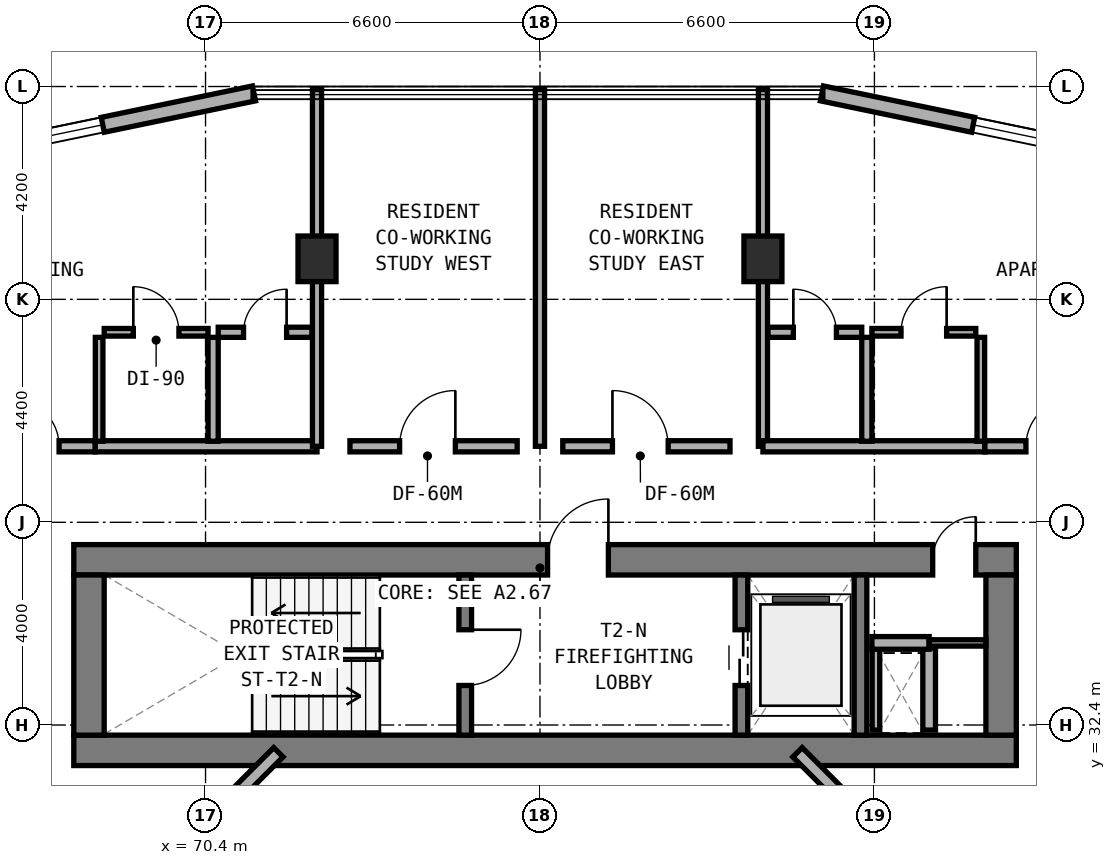
"""IFC4 building model, lengths in metres.
Left out: names, types, materials, properties, quantities, classifications, styles, units other than length and angle.
Written with IfcOpenShell. Run it as: python <this file> out.ifc"""

import sys

from ifc_helpers import new_model, si_unit, direction, frame, frame_2d, origin, origin_2d, place, context, subcontext, project, spatial, rectangle, extrude, element, fill, save


model = new_model("IFC4")
c1 = context("Model", 3, precision=1e-05, world=origin(), true_north=direction((0.0, 1.0)))
c2 = subcontext(c1, "Body", "Model", "MODEL_VIEW")
j1 = project(units=[si_unit("LENGTHUNIT", "METRE"), si_unit("PLANEANGLEUNIT", "RADIAN")], contexts=[c1])
p1 = place(None, origin())
s1 = spatial("IfcSite", under=j1, at=p1, CompositionType="ELEMENT")
p2 = place(p1, origin())
s2 = spatial("IfcBuilding", under=s1, at=p2, CompositionType="ELEMENT")
p3 = place(p2, frame((0.0, 0.0, 38.0)))
s3 = spatial("IfcBuildingStorey", under=s2, at=p3, CompositionType="ELEMENT", Elevation=38.0)
p4 = place(p3, frame((67.8, 31.9, 0.0), z_axis=(0.0, 0.0, 1.0), x_axis=(1.0, 0.0, 0.0)))
e1 = element("IfcWall", 1, at=p4, inside=s3, PredefinedType="SHEAR", context=c2, shape_type="SweptSolid", body=[
    extrude(rectangle(XDim=18.6, YDim=0.6, at=frame_2d((9.3, 0.0))), origin(), (0.0, 0.0, 1.0), 3.5),
])
p5 = place(p3, frame((67.8, 35.66, 0.0), z_axis=(0.0, 0.0, 1.0), x_axis=(1.0, 0.0, 0.0)))
e2 = element("IfcWall", 2, at=p5, inside=s3, PredefinedType="SHEAR", context=c2, shape_type="SweptSolid", body=[
    extrude(rectangle(XDim=18.6, YDim=0.6, at=frame_2d((9.3, 0.0))), origin(), (0.0, 0.0, 1.0), 3.5),
])
p6 = place(p5, frame((9.35, 0.0, 0.0)))
e3 = element("IfcOpeningElement", 3, at=p6, cuts=e2, PredefinedType="OPENING", context=c2, shape_type="SweptSolid", body=[
    extrude(rectangle(XDim=1.2, YDim=2.15, at=frame_2d((0.6, 1.075))), frame((0.0, 0.31, 0.0), z_axis=(0.0, -1.0, 0.0), x_axis=(1.0, 0.0, 0.0)), (0.0, 0.0, 1.0), 0.62),
])
p7 = place(p5, frame((16.95, 0.0, 0.0)))
e4 = element("IfcOpeningElement", 4, at=p7, cuts=e2, PredefinedType="OPENING", context=c2, shape_type="SweptSolid", body=[
    extrude(rectangle(XDim=0.85, YDim=2.1, at=frame_2d((0.425, 1.05))), frame((0.0, 0.31, 0.0), z_axis=(0.0, -1.0, 0.0), x_axis=(1.0, 0.0, 0.0)), (0.0, 0.0, 1.0), 0.62),
])
for number, where, z_axis, x_axis in (
    (5, (68.1, 32.2, 0.0), (0.0, 0.0, 1.0), (0.0, 1.0, 0.0)),
    (6, (86.1, 32.2, 0.0), (0.0, 0.0, 1.0), (0.0, 1.0, 0.0)),
):
    element("IfcWall", number, at=place(p3, frame(where, z_axis=z_axis, x_axis=x_axis)), inside=s3, PredefinedType="SHEAR", context=c2, shape_type="SweptSolid", body=[
        extrude(rectangle(XDim=3.16, YDim=0.6, at=frame_2d((1.58, 0.0))), origin(), (0.0, 0.0, 1.0), 3.5),
    ])
p8 = place(p3, frame((75.525, 32.2, 0.0), z_axis=(0.0, 0.0, 1.0), x_axis=(0.0, 1.0, 0.0)))
e7 = element("IfcWall", 7, at=p8, inside=s3, PredefinedType="STANDARD", context=c2, shape_type="SweptSolid", body=[
    extrude(rectangle(XDim=3.16, YDim=0.25, at=frame_2d((1.58, 0.0))), origin(), (0.0, 0.0, 1.0), 3.25),
])
p9 = place(p8, frame((0.98, 0.0, 0.0)))
e8 = element("IfcOpeningElement", 8, at=p9, cuts=e7, PredefinedType="OPENING", context=c2, shape_type="SweptSolid", body=[
    extrude(rectangle(XDim=1.1, YDim=2.15, at=frame_2d((0.55, 1.075))), frame((0.0, 0.135, 0.0), z_axis=(0.0, -1.0, 0.0), x_axis=(1.0, 0.0, 0.0)), (0.0, 0.0, 1.0), 0.27),
])
p10 = place(p3, frame((80.975, 32.2, 0.0), z_axis=(0.0, 0.0, 1.0), x_axis=(0.0, 1.0, 0.0)))
e9 = element("IfcWall", 9, at=p10, inside=s3, PredefinedType="STANDARD", context=c2, shape_type="SweptSolid", body=[
    extrude(rectangle(XDim=3.16, YDim=0.25, at=frame_2d((1.58, 0.0))), origin(), (0.0, 0.0, 1.0), 3.25),
])
p11 = place(p10, frame((0.98, 0.0, 0.0)))
e10 = element("IfcOpeningElement", 10, at=p11, cuts=e9, PredefinedType="OPENING", context=c2, shape_type="SweptSolid", body=[
    extrude(rectangle(XDim=1.1, YDim=2.15, at=frame_2d((0.55, 1.075))), frame((0.0, 0.135, 0.0), z_axis=(0.0, -1.0, 0.0), x_axis=(1.0, 0.0, 0.0)), (0.0, 0.0, 1.0), 0.27),
])
p12 = place(p3, frame((83.325, 32.2, 0.0), z_axis=(0.0, 0.0, 1.0), x_axis=(0.0, 1.0, 0.0)))
e11 = element("IfcWall", 11, at=p12, inside=s3, PredefinedType="STANDARD", context=c2, shape_type="SweptSolid", body=[
    extrude(rectangle(XDim=3.16, YDim=0.25, at=frame_2d((1.58, 0.0))), origin(), (0.0, 0.0, 1.0), 3.25),
])
for number, where, z_axis, x_axis in (
    (12, (72.6, 41.6, 0.0), (0.0, 0.0, 1.0), (1.0, 0.0, 0.0)),
    (13, (81.4, 41.6, 0.0), (0.0, 0.0, 1.0), (1.0, 0.0, 0.0)),
):
    element("IfcColumn", number, at=place(p3, frame(where, z_axis=z_axis, x_axis=x_axis)), inside=s3, PredefinedType="COLUMN", context=c2, shape_type="SweptSolid", body=[
        extrude(rectangle(XDim=0.75, YDim=0.9, at=origin_2d()), origin(), (0.0, 0.0, 1.0), 3.5),
    ])
p13 = place(p3, frame((91.298, 43.051, 0.0), z_axis=(0.0, 0.0, 1.0), x_axis=(-0.979128391325, 0.203242695569, 0.0)))
e14 = element("IfcWall", 14, at=p13, inside=s3, PredefinedType="STANDARD", context=c2, shape_type="SweptSolid", body=[
    extrude(rectangle(XDim=8.92, YDim=0.3, at=frame_2d((4.46, 0.0))), origin(), (0.0, 0.0, 1.0), 3.25),
])
p14 = place(p13, frame((3.472, 0.0, 0.8)))
e15 = element("IfcOpeningElement", 15, at=p14, cuts=e14, PredefinedType="OPENING", context=c2, shape_type="SweptSolid", body=[
    extrude(rectangle(XDim=2.4, YDim=1.6, at=frame_2d((1.2, 0.8))), frame((0.0, 0.16, 0.0), z_axis=(0.0, -1.0, 0.0), x_axis=(1.0, 0.0, 0.0)), (0.0, 0.0, 1.0), 0.32),
])
p15 = place(p3, frame((71.356, 44.864, 0.0), z_axis=(0.0, 0.0, 1.0), x_axis=(-0.979127260729, -0.203248142175, 0.0)))
e16 = element("IfcWall", 16, at=p15, inside=s3, PredefinedType="STANDARD", context=c2, shape_type="SweptSolid", body=[
    extrude(rectangle(XDim=8.92, YDim=0.3, at=frame_2d((4.46, 0.0))), origin(), (0.0, 0.0, 1.0), 3.25),
])
p16 = place(p15, frame((3.048, 0.0, 0.8)))
e17 = element("IfcOpeningElement", 17, at=p16, cuts=e16, PredefinedType="OPENING", context=c2, shape_type="SweptSolid", body=[
    extrude(rectangle(XDim=2.4, YDim=1.6, at=frame_2d((1.2, 0.8))), frame((0.0, 0.16, 0.0), z_axis=(0.0, -1.0, 0.0), x_axis=(1.0, 0.0, 0.0)), (0.0, 0.0, 1.0), 0.32),
])
for number, where, z_axis, x_axis in (
    (18, (83.716, 30.228, 0.0), (0.0, 0.0, 1.0), (-0.707, 0.707, 0.0)),
    (19, (71.838, 31.862, 0.0), (0.0, 0.0, 1.0), (-0.707, -0.707, 0.0)),
):
    element("IfcWall", number, at=place(p3, frame(where, z_axis=z_axis, x_axis=x_axis)), inside=s3, PredefinedType="STANDARD", context=c2, shape_type="SweptSolid", body=[
        extrude(rectangle(XDim=2.311, YDim=0.26, at=frame_2d((1.155, 0.0))), origin(), (0.0, 0.0, 1.0), 3.25),
    ])
p17 = place(p3, frame((83.63, 32.3, 0.0), z_axis=(0.0, 0.0, 1.0), x_axis=(0.0, 1.0, 0.0)))
e20 = element("IfcWall", 20, at=p17, inside=s3, PredefinedType="PARTITIONING", context=c2, shape_type="SweptSolid", body=[
    extrude(rectangle(XDim=1.62, YDim=0.15, at=frame_2d((0.81, 0.0))), origin(), (0.0, 0.0, 1.0), 2.725),
])
p18 = place(p3, frame((84.68, 32.3, 0.0), z_axis=(0.0, 0.0, 1.0), x_axis=(0.0, 1.0, 0.0)))
e21 = element("IfcWall", 21, at=p18, inside=s3, PredefinedType="SOLIDWALL", context=c2, shape_type="SweptSolid", body=[
    extrude(rectangle(XDim=1.62, YDim=0.25, at=frame_2d((0.81, 0.0))), origin(), (0.0, 0.0, 1.0), 3.22),
])
p19 = place(p3, frame((83.55, 34.02, 0.0), z_axis=(0.0, 0.0, 1.0), x_axis=(1.0, 0.0, 0.0)))
e22 = element("IfcWall", 22, at=p19, inside=s3, PredefinedType="SOLIDWALL", context=c2, shape_type="SweptSolid", body=[
    extrude(rectangle(XDim=1.13, YDim=0.25, at=frame_2d((0.565, 0.0))), origin(), (0.0, 0.0, 1.0), 3.22),
])
p20 = place(p3, frame((84.68, 34.02, 0.0), z_axis=(0.0, 0.0, 1.0), x_axis=(1.0, 0.0, 0.0)))
e23 = element("IfcWall", 23, at=p20, inside=s3, PredefinedType="PARTITIONING", context=c2, shape_type="SweptSolid", body=[
    extrude(rectangle(XDim=1.12, YDim=0.125, at=frame_2d((0.56, 0.0))), origin(), (0.0, 0.0, 1.0), 3.22),
])
p21 = place(p3, frame((68.22, 37.9, 0.0), z_axis=(0.0, 0.0, 1.0), x_axis=(1.0, 0.0, 0.0)))
e24 = element("IfcWall", 24, at=p21, inside=s3, PredefinedType="SOLIDWALL", context=c2, shape_type="SweptSolid", body=[
    extrude(rectangle(XDim=4.38, YDim=0.22, at=frame_2d((2.19, 0.0))), origin(), (0.0, 0.0, 1.0), 2.725),
])
p22 = place(p3, frame((65.85, 37.9, 0.0), z_axis=(0.0, 0.0, 1.0), x_axis=(1.0, 0.0, 0.0)))
e25 = element("IfcWall", 25, at=p22, inside=s3, PredefinedType="SOLIDWALL", context=c2, shape_type="SweptSolid", body=[
    extrude(rectangle(XDim=2.37, YDim=0.22, at=frame_2d((1.185, 0.0))), origin(), (0.0, 0.0, 1.0), 3.22),
])
p23 = place(p22, frame((0.71, 0.0, 0.0)))
e26 = element("IfcOpeningElement", 26, at=p23, cuts=e25, PredefinedType="OPENING", context=c2, shape_type="SweptSolid", body=[
    extrude(rectangle(XDim=0.95, YDim=2.1, at=frame_2d((0.475, 1.05))), frame((0.0, 0.12, 0.0), z_axis=(0.0, -1.0, 0.0), x_axis=(1.0, 0.0, 0.0)), (0.0, 0.0, 1.0), 0.24),
])
p24 = place(p3, frame((70.55, 38.0, 0.0), z_axis=(0.0, 0.0, 1.0), x_axis=(0.0, 1.0, 0.0)))
e27 = element("IfcWall", 27, at=p24, inside=s3, PredefinedType="PLUMBINGWALL", context=c2, shape_type="SweptSolid", body=[
    extrude(rectangle(XDim=2.05, YDim=0.2, at=frame_2d((1.025, 0.0))), origin(), (0.0, 0.0, 1.0), 3.22),
])
p25 = place(p3, frame((68.3, 38.0, 0.0), z_axis=(0.0, 0.0, 1.0), x_axis=(0.0, 1.0, 0.0)))
e28 = element("IfcWall", 28, at=p25, inside=s3, PredefinedType="PARTITIONING", context=c2, shape_type="SweptSolid", body=[
    extrude(rectangle(XDim=2.05, YDim=0.15, at=frame_2d((1.025, 0.0))), origin(), (0.0, 0.0, 1.0), 3.22),
])
p26 = place(p3, frame((70.65, 40.15, 0.0), z_axis=(0.0, 0.0, 1.0), x_axis=(1.0, 0.0, 0.0)))
e29 = element("IfcWall", 29, at=p26, inside=s3, PredefinedType="PLUMBINGWALL", context=c2, shape_type="SweptSolid", body=[
    extrude(rectangle(XDim=1.85, YDim=0.2, at=frame_2d((0.925, 0.0))), origin(), (0.0, 0.0, 1.0), 3.22),
])
p27 = place(p26, frame((0.5, 0.0, 0.0)))
e30 = element("IfcOpeningElement", 30, at=p27, cuts=e29, PredefinedType="OPENING", context=c2, shape_type="SweptSolid", body=[
    extrude(rectangle(XDim=0.85, YDim=2.1, at=frame_2d((0.425, 1.05))), frame((0.0, 0.11, 0.0), z_axis=(0.0, -1.0, 0.0), x_axis=(1.0, 0.0, 0.0)), (0.0, 0.0, 1.0), 0.22),
])
p28 = place(p3, frame((68.4, 40.15, 0.0), z_axis=(0.0, 0.0, 1.0), x_axis=(1.0, 0.0, 0.0)))
e31 = element("IfcWall", 31, at=p28, inside=s3, PredefinedType="PARTITIONING", context=c2, shape_type="SweptSolid", body=[
    extrude(rectangle(XDim=2.05, YDim=0.15, at=frame_2d((1.025, 0.0))), origin(), (0.0, 0.0, 1.0), 3.22),
])
p29 = place(p28, frame((0.575, 0.0, 0.0)))
e32 = element("IfcOpeningElement", 32, at=p29, cuts=e31, PredefinedType="OPENING", context=c2, shape_type="SweptSolid", body=[
    extrude(rectangle(XDim=0.9, YDim=2.1, at=frame_2d((0.45, 1.05))), frame((0.0, 0.085, 0.0), z_axis=(0.0, -1.0, 0.0), x_axis=(1.0, 0.0, 0.0)), (0.0, 0.0, 1.0), 0.17),
])
p30 = place(p3, frame((72.6, 37.9, 0.0), z_axis=(0.0, 0.0, 1.0), x_axis=(0.0, 1.0, 0.0)))
e33 = element("IfcWall", 33, at=p30, inside=s3, PredefinedType="SOLIDWALL", context=c2, shape_type="SweptSolid", body=[
    extrude(rectangle(XDim=7.04, YDim=0.18, at=frame_2d((3.52, 0.0))), origin(), (0.0, 0.0, 1.0), 2.725),
])
p31 = place(p3, frame((77.0, 37.9, 0.0), z_axis=(0.0, 0.0, 1.0), x_axis=(0.0, 1.0, 0.0)))
e34 = element("IfcWall", 34, at=p31, inside=s3, PredefinedType="SOLIDWALL", context=c2, shape_type="SweptSolid", body=[
    extrude(rectangle(XDim=7.04, YDim=0.18, at=frame_2d((3.52, 0.0))), origin(), (0.0, 0.0, 1.0), 2.865),
])
p32 = place(p3, frame((73.25, 37.9, 0.0), z_axis=(0.0, 0.0, 1.0), x_axis=(1.0, 0.0, 0.0)))
e35 = element("IfcWall", 35, at=p32, inside=s3, PredefinedType="SOLIDWALL", context=c2, shape_type="SweptSolid", body=[
    extrude(rectangle(XDim=3.3, YDim=0.22, at=frame_2d((1.65, 0.0))), origin(), (0.0, 0.0, 1.0), 3.22),
])
p33 = place(p32, frame((0.98, 0.0, 0.0)))
e36 = element("IfcOpeningElement", 36, at=p33, cuts=e35, PredefinedType="OPENING", context=c2, shape_type="SweptSolid", body=[
    extrude(rectangle(XDim=1.1, YDim=2.1, at=frame_2d((0.55, 1.05))), frame((0.0, 0.12, 0.0), z_axis=(0.0, -1.0, 0.0), x_axis=(1.0, 0.0, 0.0)), (0.0, 0.0, 1.0), 0.24),
])
p34 = place(p3, frame((77.45, 37.9, 0.0), z_axis=(0.0, 0.0, 1.0), x_axis=(1.0, 0.0, 0.0)))
e37 = element("IfcWall", 37, at=p34, inside=s3, PredefinedType="SOLIDWALL", context=c2, shape_type="SweptSolid", body=[
    extrude(rectangle(XDim=3.3, YDim=0.22, at=frame_2d((1.65, 0.0))), origin(), (0.0, 0.0, 1.0), 3.22),
])
p35 = place(p34, frame((0.98, 0.0, 0.0)))
e38 = element("IfcOpeningElement", 38, at=p35, cuts=e37, PredefinedType="OPENING", context=c2, shape_type="SweptSolid", body=[
    extrude(rectangle(XDim=1.1, YDim=2.1, at=frame_2d((0.55, 1.05))), frame((0.0, 0.12, 0.0), z_axis=(0.0, -1.0, 0.0), x_axis=(1.0, 0.0, 0.0)), (0.0, 0.0, 1.0), 0.24),
])
p36 = place(p3, frame((81.4, 37.9, 0.0), z_axis=(0.0, 0.0, 1.0), x_axis=(0.0, 1.0, 0.0)))
e39 = element("IfcWall", 39, at=p36, inside=s3, PredefinedType="SOLIDWALL", context=c2, shape_type="SweptSolid", body=[
    extrude(rectangle(XDim=7.04, YDim=0.18, at=frame_2d((3.52, 0.0))), origin(), (0.0, 0.0, 1.0), 2.725),
])
p37 = place(p3, frame((81.4, 37.9, 0.0), z_axis=(0.0, 0.0, 1.0), x_axis=(1.0, 0.0, 0.0)))
e40 = element("IfcWall", 40, at=p37, inside=s3, PredefinedType="SOLIDWALL", context=c2, shape_type="SweptSolid", body=[
    extrude(rectangle(XDim=4.38, YDim=0.22, at=frame_2d((2.19, 0.0))), origin(), (0.0, 0.0, 1.0), 2.725),
])
p38 = place(p3, frame((85.78, 37.9, 0.0), z_axis=(0.0, 0.0, 1.0), x_axis=(1.0, 0.0, 0.0)))
e41 = element("IfcWall", 41, at=p38, inside=s3, PredefinedType="SOLIDWALL", context=c2, shape_type="SweptSolid", body=[
    extrude(rectangle(XDim=2.57, YDim=0.22, at=frame_2d((1.285, 0.0))), origin(), (0.0, 0.0, 1.0), 3.22),
])
p39 = place(p38, frame((0.81, 0.0, 0.0)))
e42 = element("IfcOpeningElement", 42, at=p39, cuts=e41, PredefinedType="OPENING", context=c2, shape_type="SweptSolid", body=[
    extrude(rectangle(XDim=0.95, YDim=2.1, at=frame_2d((0.475, 1.05))), frame((0.0, 0.12, 0.0), z_axis=(0.0, -1.0, 0.0), x_axis=(1.0, 0.0, 0.0)), (0.0, 0.0, 1.0), 0.24),
])
p40 = place(p3, frame((83.45, 38.0, 0.0), z_axis=(0.0, 0.0, 1.0), x_axis=(0.0, 1.0, 0.0)))
e43 = element("IfcWall", 43, at=p40, inside=s3, PredefinedType="PLUMBINGWALL", context=c2, shape_type="SweptSolid", body=[
    extrude(rectangle(XDim=2.05, YDim=0.2, at=frame_2d((1.025, 0.0))), origin(), (0.0, 0.0, 1.0), 3.22),
])
p41 = place(p3, frame((85.7, 38.0, 0.0), z_axis=(0.0, 0.0, 1.0), x_axis=(0.0, 1.0, 0.0)))
e44 = element("IfcWall", 44, at=p41, inside=s3, PredefinedType="PARTITIONING", context=c2, shape_type="SweptSolid", body=[
    extrude(rectangle(XDim=2.05, YDim=0.15, at=frame_2d((1.025, 0.0))), origin(), (0.0, 0.0, 1.0), 3.22),
])
p42 = place(p3, frame((81.5, 40.15, 0.0), z_axis=(0.0, 0.0, 1.0), x_axis=(1.0, 0.0, 0.0)))
e45 = element("IfcWall", 45, at=p42, inside=s3, PredefinedType="PLUMBINGWALL", context=c2, shape_type="SweptSolid", body=[
    extrude(rectangle(XDim=1.85, YDim=0.2, at=frame_2d((0.925, 0.0))), origin(), (0.0, 0.0, 1.0), 2.725),
])
p43 = place(p42, frame((0.5, 0.0, 0.0)))
e46 = element("IfcOpeningElement", 46, at=p43, cuts=e45, PredefinedType="OPENING", context=c2, shape_type="SweptSolid", body=[
    extrude(rectangle(XDim=0.85, YDim=2.1, at=frame_2d((0.425, 1.05))), frame((0.0, 0.11, 0.0), z_axis=(0.0, -1.0, 0.0), x_axis=(1.0, 0.0, 0.0)), (0.0, 0.0, 1.0), 0.22),
])
p44 = place(p3, frame((83.55, 40.15, 0.0), z_axis=(0.0, 0.0, 1.0), x_axis=(1.0, 0.0, 0.0)))
e47 = element("IfcWall", 47, at=p44, inside=s3, PredefinedType="PARTITIONING", context=c2, shape_type="SweptSolid", body=[
    extrude(rectangle(XDim=2.05, YDim=0.15, at=frame_2d((1.025, 0.0))), origin(), (0.0, 0.0, 1.0), 3.22),
])
p45 = place(p44, frame((0.575, 0.0, 0.0)))
e48 = element("IfcOpeningElement", 48, at=p45, cuts=e47, PredefinedType="OPENING", context=c2, shape_type="SweptSolid", body=[
    extrude(rectangle(XDim=0.9, YDim=2.1, at=frame_2d((0.45, 1.05))), frame((0.0, 0.085, 0.0), z_axis=(0.0, -1.0, 0.0), x_axis=(1.0, 0.0, 0.0)), (0.0, 0.0, 1.0), 0.17),
])
p46 = place(p14, origin())
e49 = element("IfcWindow", 49, at=p46, inside=s3, PartitioningType="SINGLE_PANEL", PredefinedType="WINDOW", context=c2, shape_type="SweptSolid", body=[
    extrude(rectangle(XDim=2.4, YDim=1.6, at=frame_2d((1.2, 0.8))), frame((0.0, 0.03, 0.0), z_axis=(0.0, -1.0, 0.0), x_axis=(1.0, 0.0, 0.0)), (0.0, 0.0, 1.0), 0.06),
])
fill(e15, e49)
p47 = place(p16, origin())
e50 = element("IfcWindow", 50, at=p47, inside=s3, PartitioningType="SINGLE_PANEL", PredefinedType="WINDOW", context=c2, shape_type="SweptSolid", body=[
    extrude(rectangle(XDim=2.4, YDim=1.6, at=frame_2d((1.2, 0.8))), frame((0.0, 0.03, 0.0), z_axis=(0.0, -1.0, 0.0), x_axis=(1.0, 0.0, 0.0)), (0.0, 0.0, 1.0), 0.06),
])
fill(e17, e50)
p48 = place(p9, frame((1.1, 0.0, 0.0), z_axis=(0.0, 0.0, 1.0), x_axis=(-1.0, 0.0, 0.0)))
e51 = element("IfcDoor", 51, at=p48, inside=s3, OperationType="SINGLE_SWING_LEFT", PredefinedType="DOOR", context=c2, shape_type="SweptSolid", body=[
    extrude(rectangle(XDim=1.1, YDim=2.15, at=frame_2d((0.55, 1.075))), frame((0.0, 0.025, 0.0), z_axis=(0.0, -1.0, 0.0), x_axis=(1.0, 0.0, 0.0)), (0.0, 0.0, 1.0), 0.05),
])
fill(e8, e51)
p49 = place(p6, origin())
e52 = element("IfcDoor", 52, at=p49, inside=s3, OperationType="SINGLE_SWING_RIGHT", PredefinedType="DOOR", context=c2, shape_type="SweptSolid", body=[
    extrude(rectangle(XDim=1.2, YDim=2.15, at=frame_2d((0.6, 1.075))), frame((0.0, 0.025, 0.0), z_axis=(0.0, -1.0, 0.0), x_axis=(1.0, 0.0, 0.0)), (0.0, 0.0, 1.0), 0.05),
])
fill(e3, e52)
p50 = place(p11, origin())
e53 = element("IfcDoor", 53, at=p50, inside=s3, OperationType="DOUBLE_DOOR_SLIDING", PredefinedType="DOOR", context=c2, shape_type="SweptSolid", body=[
    extrude(rectangle(XDim=1.1, YDim=2.15, at=frame_2d((0.55, 1.075))), frame((0.0, 0.025, 0.0), z_axis=(0.0, -1.0, 0.0), x_axis=(1.0, 0.0, 0.0)), (0.0, 0.0, 1.0), 0.05),
])
fill(e10, e53)
p51 = place(p7, origin())
e54 = element("IfcDoor", 54, at=p51, inside=s3, OperationType="SINGLE_SWING_RIGHT", PredefinedType="DOOR", context=c2, shape_type="SweptSolid", body=[
    extrude(rectangle(XDim=0.85, YDim=2.1, at=frame_2d((0.425, 1.05))), frame((0.0, 0.025, 0.0), z_axis=(0.0, -1.0, 0.0), x_axis=(1.0, 0.0, 0.0)), (0.0, 0.0, 1.0), 0.05),
])
fill(e4, e54)
p52 = place(p23, origin())
e55 = element("IfcDoor", 55, at=p52, inside=s3, OperationType="SINGLE_SWING_LEFT", PredefinedType="DOOR", context=c2, shape_type="SweptSolid", body=[
    extrude(rectangle(XDim=0.95, YDim=2.1, at=frame_2d((0.475, 1.05))), frame((0.0, 0.025, 0.0), z_axis=(0.0, -1.0, 0.0), x_axis=(1.0, 0.0, 0.0)), (0.0, 0.0, 1.0), 0.05),
])
fill(e26, e55)
p53 = place(p27, origin())
e56 = element("IfcDoor", 56, at=p53, inside=s3, OperationType="SINGLE_SWING_RIGHT", PredefinedType="DOOR", context=c2, shape_type="SweptSolid", body=[
    extrude(rectangle(XDim=0.85, YDim=2.1, at=frame_2d((0.425, 1.05))), frame((0.0, 0.025, 0.0), z_axis=(0.0, -1.0, 0.0), x_axis=(1.0, 0.0, 0.0)), (0.0, 0.0, 1.0), 0.05),
])
fill(e30, e56)
p54 = place(p29, origin())
e57 = element("IfcDoor", 57, at=p54, inside=s3, OperationType="SINGLE_SWING_LEFT", PredefinedType="DOOR", context=c2, shape_type="SweptSolid", body=[
    extrude(rectangle(XDim=0.9, YDim=2.1, at=frame_2d((0.45, 1.05))), frame((0.0, 0.025, 0.0), z_axis=(0.0, -1.0, 0.0), x_axis=(1.0, 0.0, 0.0)), (0.0, 0.0, 1.0), 0.05),
])
fill(e32, e57)
p55 = place(p33, origin())
e58 = element("IfcDoor", 58, at=p55, inside=s3, OperationType="SINGLE_SWING_RIGHT", PredefinedType="DOOR", context=c2, shape_type="SweptSolid", body=[
    extrude(rectangle(XDim=1.1, YDim=2.1, at=frame_2d((0.55, 1.05))), frame((0.0, 0.025, 0.0), z_axis=(0.0, -1.0, 0.0), x_axis=(1.0, 0.0, 0.0)), (0.0, 0.0, 1.0), 0.05),
])
fill(e36, e58)
p56 = place(p35, origin())
e59 = element("IfcDoor", 59, at=p56, inside=s3, OperationType="SINGLE_SWING_LEFT", PredefinedType="DOOR", context=c2, shape_type="SweptSolid", body=[
    extrude(rectangle(XDim=1.1, YDim=2.1, at=frame_2d((0.55, 1.05))), frame((0.0, 0.025, 0.0), z_axis=(0.0, -1.0, 0.0), x_axis=(1.0, 0.0, 0.0)), (0.0, 0.0, 1.0), 0.05),
])
fill(e38, e59)
p57 = place(p39, origin())
e60 = element("IfcDoor", 60, at=p57, inside=s3, OperationType="SINGLE_SWING_RIGHT", PredefinedType="DOOR", context=c2, shape_type="SweptSolid", body=[
    extrude(rectangle(XDim=0.95, YDim=2.1, at=frame_2d((0.475, 1.05))), frame((0.0, 0.025, 0.0), z_axis=(0.0, -1.0, 0.0), x_axis=(1.0, 0.0, 0.0)), (0.0, 0.0, 1.0), 0.05),
])
fill(e42, e60)
p58 = place(p43, origin())
e61 = element("IfcDoor", 61, at=p58, inside=s3, OperationType="SINGLE_SWING_LEFT", PredefinedType="DOOR", context=c2, shape_type="SweptSolid", body=[
    extrude(rectangle(XDim=0.85, YDim=2.1, at=frame_2d((0.425, 1.05))), frame((0.0, 0.025, 0.0), z_axis=(0.0, -1.0, 0.0), x_axis=(1.0, 0.0, 0.0)), (0.0, 0.0, 1.0), 0.05),
])
fill(e46, e61)
p59 = place(p45, origin())
e62 = element("IfcDoor", 62, at=p59, inside=s3, OperationType="SINGLE_SWING_RIGHT", PredefinedType="DOOR", context=c2, shape_type="SweptSolid", body=[
    extrude(rectangle(XDim=0.9, YDim=2.1, at=frame_2d((0.45, 1.05))), frame((0.0, 0.025, 0.0), z_axis=(0.0, -1.0, 0.0), x_axis=(1.0, 0.0, 0.0)), (0.0, 0.0, 1.0), 0.05),
])
fill(e48, e62)
save(model, sys.argv[1])
